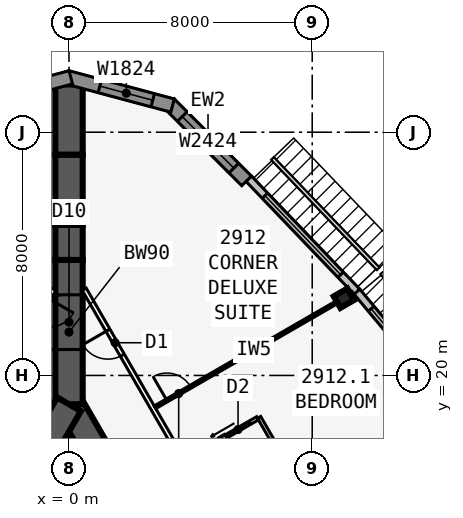
"""IFC4 building model, lengths in metres.
Left out: names, types, materials, properties, quantities, classifications, styles, units other than length and angle.
Written with IfcOpenShell. Run it as: python <this file> out.ifc"""

import sys

from ifc_helpers import new_model, si_unit, direction, frame, frame_2d, origin, origin_2d, place, context, subcontext, project, spatial, polyline, rectangle, i_section, outline, extrude, element, fill, save


model = new_model("IFC4")
c1 = context("Model", 3, precision=1e-05, world=origin(), true_north=direction((0.0, 1.0)))
c2 = subcontext(c1, "Body", "Model", "MODEL_VIEW")
j1 = project(units=[si_unit("LENGTHUNIT", "METRE"), si_unit("PLANEANGLEUNIT", "RADIAN")], contexts=[c1])
p1 = place(None, origin())
s1 = spatial("IfcSite", under=j1, at=p1, CompositionType="ELEMENT")
p2 = place(p1, origin())
s2 = spatial("IfcBuilding", under=s1, at=p2, CompositionType="ELEMENT")
p3 = place(p2, frame((0.0, 0.0, 114.7)))
s3 = spatial("IfcBuildingStorey", under=s2, at=p3, CompositionType="ELEMENT", Elevation=114.7)
p4 = place(p3, frame((16.5, -9.526, 0.0), z_axis=(0.0, 0.0, 1.0), x_axis=(-0.499999749417, 0.866025548458, 0.0)))
e1 = element("IfcWall", 1, at=p4, inside=s3, PredefinedType="SHEAR", context=c2, shape_type="SweptSolid", body=[
    extrude(rectangle(XDim=33.0, YDim=0.9, at=frame_2d((16.5, 0.0))), origin(), (0.0, 0.0, 1.0), 3.4),
])
p5 = place(p4, frame((14.15, 0.0, 0.0)))
e2 = element("IfcOpeningElement", 2, at=p5, cuts=e1, PredefinedType="OPENING", context=c2, shape_type="SweptSolid", body=[
    extrude(rectangle(XDim=1.8, YDim=2.13, at=frame_2d((0.9, 1.065))), frame((0.0, 0.46, 0.0), z_axis=(0.0, -1.0, 0.0), x_axis=(1.0, 0.0, 0.0)), (0.0, 0.0, 1.0), 0.92),
])
p6 = place(p4, frame((12.6, 0.0, 0.0)))
e3 = element("IfcOpeningElement", 3, at=p6, cuts=e1, PredefinedType="OPENING", context=c2, shape_type="SweptSolid", body=[
    extrude(rectangle(XDim=1.0, YDim=2.13, at=frame_2d((0.5, 1.065))), frame((0.0, 0.46, 0.0), z_axis=(0.0, -1.0, 0.0), x_axis=(1.0, 0.0, 0.0)), (0.0, 0.0, 1.0), 0.92),
])
p7 = place(p3, frame((0.0, 19.052, 0.0), z_axis=(0.0, 0.0, 1.0), x_axis=(-0.499999749417, -0.866025548458, 0.0)))
e4 = element("IfcWall", 4, at=p7, inside=s3, PredefinedType="SHEAR", context=c2, shape_type="SweptSolid", body=[
    extrude(rectangle(XDim=33.0, YDim=0.9, at=frame_2d((16.5, 0.0))), origin(), (0.0, 0.0, 1.0), 3.4),
])
p8 = place(p7, frame((14.15, 0.0, 0.0)))
e5 = element("IfcOpeningElement", 5, at=p8, cuts=e4, PredefinedType="OPENING", context=c2, shape_type="SweptSolid", body=[
    extrude(rectangle(XDim=1.8, YDim=2.13, at=frame_2d((0.9, 1.065))), frame((0.0, 0.46, 0.0), z_axis=(0.0, -1.0, 0.0), x_axis=(1.0, 0.0, 0.0)), (0.0, 0.0, 1.0), 0.92),
])
p9 = place(p7, frame((12.6, 0.0, 0.0)))
e6 = element("IfcOpeningElement", 6, at=p9, cuts=e4, PredefinedType="OPENING", context=c2, shape_type="SweptSolid", body=[
    extrude(rectangle(XDim=1.0, YDim=2.13, at=frame_2d((0.5, 1.065))), frame((0.0, 0.46, 0.0), z_axis=(0.0, -1.0, 0.0), x_axis=(1.0, 0.0, 0.0)), (0.0, 0.0, 1.0), 0.92),
])
p10 = place(p3, frame((0.0, 19.052, 0.0), z_axis=(0.0, 0.0, 1.0), x_axis=(0.0, 1.0, 0.0)))
e7 = element("IfcWall", 7, at=p10, inside=s3, PredefinedType="SHEAR", context=c2, shape_type="SweptSolid", body=[
    extrude(rectangle(XDim=4.746, YDim=0.9, at=frame_2d((2.373, 0.0))), origin(), (0.0, 0.0, 1.0), 3.4),
])
p11 = place(p10, frame((1.8, 0.0, 0.0)))
e8 = element("IfcOpeningElement", 8, at=p11, cuts=e7, PredefinedType="OPENING", context=c2, shape_type="SweptSolid", body=[
    extrude(rectangle(XDim=1.8, YDim=2.13, at=frame_2d((0.9, 1.065))), frame((0.0, 0.46, 0.0), z_axis=(0.0, -1.0, 0.0), x_axis=(1.0, 0.0, 0.0)), (0.0, 0.0, 1.0), 0.92),
])
p12 = place(p3, frame((0.0, 23.799, 0.0), z_axis=(0.0, 0.0, 1.0), x_axis=(0.0, 1.0, 0.0)))
e9 = element("IfcWall", 9, at=p12, inside=s3, PredefinedType="SHEAR", context=c2, shape_type="SweptSolid", body=[
    extrude(rectangle(XDim=1.155, YDim=0.9, at=frame_2d((0.577, 0.0))), origin(), (0.0, 0.0, 1.0), 3.4),
])
p13 = place(p3, frame((0.0, 24.953, 0.0), z_axis=(0.0, 0.0, 1.0), x_axis=(0.0, 1.0, 0.0)))
e10 = element("IfcWall", 10, at=p13, inside=s3, PredefinedType="SHEAR", context=c2, shape_type="SweptSolid", body=[
    extrude(rectangle(XDim=2.309, YDim=0.9, at=frame_2d((1.155, 0.0))), origin(), (0.0, 0.0, 1.0), 3.4),
])
p14 = place(p3, frame((0.0, 27.263, 0.0), z_axis=(0.0, 0.0, 1.0), x_axis=(0.0, 1.0, 0.0)))
e11 = element("IfcWall", 11, at=p14, inside=s3, PredefinedType="SHEAR", context=c2, shape_type="SweptSolid", body=[
    extrude(rectangle(XDim=2.31, YDim=0.9, at=frame_2d((1.155, 0.0))), origin(), (0.0, 0.0, 1.0), 3.4),
])
p15 = place(p3, frame((9.041, 22.541, 0.0), z_axis=(0.0, 0.0, 1.0), x_axis=(-0.5, 0.866025403784, 0.0)))
e12 = element("IfcColumn", 12, at=p15, inside=s3, PredefinedType="COLUMN", context=c2, shape_type="SweptSolid", body=[
    extrude(i_section(OverallWidth=0.437, OverallDepth=0.513, WebThickness=0.061, FlangeThickness=0.097, at=origin_2d()), origin(), (0.0, 0.0, 1.0), 3.4),
])
p16 = place(p3, frame((12.723, 18.868, 0.0), z_axis=(0.0, 0.0, 1.0), x_axis=(-0.641810386606, 0.766863369607, 0.0)))
e13 = element("IfcWall", 13, at=p16, inside=s3, PredefinedType="STANDARD", context=c2, shape_type="SweptSolid", body=[
    extrude(rectangle(XDim=5.076, YDim=0.25, at=frame_2d((2.538, 0.0))), origin(), (0.0, 0.0, 1.0), 3.235),
])
p17 = place(p16, frame((0.738, 0.0, 0.45)))
e14 = element("IfcOpeningElement", 14, at=p17, cuts=e13, PredefinedType="OPENING", context=c2, shape_type="SweptSolid", body=[
    extrude(rectangle(XDim=3.6, YDim=2.4, at=frame_2d((1.8, 1.2))), frame((0.0, 0.135, 0.0), z_axis=(0.0, -1.0, 0.0), x_axis=(1.0, 0.0, 0.0)), (0.0, 0.0, 1.0), 0.27),
])
p18 = place(p3, frame((9.471, 22.754, 0.0), z_axis=(0.0, 0.0, 1.0), x_axis=(-0.691719937936, 0.722165858693, 0.0)))
e15 = element("IfcWall", 15, at=p18, inside=s3, PredefinedType="STANDARD", context=c2, shape_type="SweptSolid", body=[
    extrude(rectangle(XDim=5.148, YDim=0.25, at=frame_2d((2.574, 0.0))), origin(), (0.0, 0.0, 1.0), 3.235),
])
p19 = place(p18, frame((0.774, 0.0, 0.45)))
e16 = element("IfcOpeningElement", 16, at=p19, cuts=e15, PredefinedType="OPENING", context=c2, shape_type="SweptSolid", body=[
    extrude(rectangle(XDim=3.6, YDim=2.4, at=frame_2d((1.8, 1.2))), frame((0.0, 0.135, 0.0), z_axis=(0.0, -1.0, 0.0), x_axis=(1.0, 0.0, 0.0)), (0.0, 0.0, 1.0), 0.27),
])
p20 = place(p3, frame((5.841, 26.399, 0.0), z_axis=(0.0, 0.0, 1.0), x_axis=(-0.707106781187, 0.707106781187, 0.0)))
e17 = element("IfcWall", 17, at=p20, inside=s3, PredefinedType="SOLIDWALL", context=c2, shape_type="SweptSolid", body=[
    extrude(rectangle(XDim=3.586, YDim=0.45, at=frame_2d((1.793, 0.0))), origin(), (0.0, 0.0, 1.0), 3.235),
])
p21 = place(p20, frame((0.593, 0.0, 0.45)))
e18 = element("IfcOpeningElement", 18, at=p21, cuts=e17, PredefinedType="OPENING", context=c2, shape_type="SweptSolid", body=[
    extrude(rectangle(XDim=2.4, YDim=2.4, at=frame_2d((1.2, 1.2))), frame((0.0, 0.235, 0.0), z_axis=(0.0, -1.0, 0.0), x_axis=(1.0, 0.0, 0.0)), (0.0, 0.0, 1.0), 0.47),
])
p22 = place(p3, frame((3.406, 28.877, 0.0), z_axis=(0.0, 0.0, 1.0), x_axis=(-0.965924653531, 0.258823421857, 0.0)))
e19 = element("IfcWall", 19, at=p22, inside=s3, PredefinedType="SOLIDWALL", context=c2, shape_type="SweptSolid", body=[
    extrude(outline(polyline([(3.586, 0.225), (3.527, 0.225), (3.035, 0.093), (3.0, 0.225), (0.0, 0.225), (0.0, -0.225), (3.586, -0.225), (3.586, 0.225)])), origin(), (0.0, 0.0, 1.0), 3.235),
])
p23 = place(p22, frame((0.675, 0.0, 0.45)))
e20 = element("IfcOpeningElement", 20, at=p23, cuts=e19, PredefinedType="OPENING", context=c2, shape_type="SweptSolid", body=[
    extrude(rectangle(XDim=1.8, YDim=2.4, at=frame_2d((0.9, 1.2))), frame((0.0, 0.235, 0.0), z_axis=(0.0, -1.0, 0.0), x_axis=(1.0, 0.0, 0.0)), (0.0, 0.0, 1.0), 0.47),
])
p24 = place(p3, frame((0.058, 29.805, 0.0), z_axis=(0.0, 0.0, 1.0), x_axis=(-0.965924653531, -0.258823421857, 0.0)))
e21 = element("IfcWall", 21, at=p24, inside=s3, PredefinedType="SOLIDWALL", context=c2, shape_type="SweptSolid", body=[
    extrude(outline(polyline([(3.586, 0.225), (0.586, 0.225), (0.551, 0.093), (0.06, 0.225), (0.0, 0.225), (0.0, -0.225), (3.586, -0.225), (3.586, 0.225)])), origin(), (0.0, 0.0, 1.0), 3.235),
])
p25 = place(p24, frame((1.111, 0.0, 0.45)))
e22 = element("IfcOpeningElement", 22, at=p25, cuts=e21, PredefinedType="OPENING", context=c2, shape_type="SweptSolid", body=[
    extrude(rectangle(XDim=1.8, YDim=2.4, at=frame_2d((0.9, 1.2))), frame((0.0, 0.235, 0.0), z_axis=(0.0, -1.0, 0.0), x_axis=(1.0, 0.0, 0.0)), (0.0, 0.0, 1.0), 0.47),
])
p26 = place(p3, frame((20.027, -10.985, 0.0), z_axis=(0.0, 0.0, 1.0), x_axis=(-0.500001677587, 0.866024435227, 0.0)))
e23 = element("IfcWall", 23, at=p26, inside=s3, PredefinedType="PARTITIONING", context=c2, shape_type="SweptSolid", body=[
    extrude(rectangle(XDim=39.054, YDim=0.15, at=frame_2d((19.527, 0.0))), origin(), (0.0, 0.0, 1.0), 3.235),
])
p27 = place(p26, frame((0.352, 0.0, 0.0)))
e24 = element("IfcOpeningElement", 24, at=p27, cuts=e23, PredefinedType="OPENING", context=c2, shape_type="SweptSolid", body=[
    extrude(rectangle(XDim=0.95, YDim=2.13, at=frame_2d((0.475, 1.065))), frame((0.0, 0.085, 0.0), z_axis=(0.0, -1.0, 0.0), x_axis=(1.0, 0.0, 0.0)), (0.0, 0.0, 1.0), 0.17),
])
p28 = place(p26, frame((7.752, 0.0, 0.0)))
e25 = element("IfcOpeningElement", 25, at=p28, cuts=e23, PredefinedType="OPENING", context=c2, shape_type="SweptSolid", body=[
    extrude(rectangle(XDim=0.95, YDim=2.13, at=frame_2d((0.475, 1.065))), frame((0.0, 0.085, 0.0), z_axis=(0.0, -1.0, 0.0), x_axis=(1.0, 0.0, 0.0)), (0.0, 0.0, 1.0), 0.17),
])
p29 = place(p26, frame((17.752, 0.0, 0.0)))
e26 = element("IfcOpeningElement", 26, at=p29, cuts=e23, PredefinedType="OPENING", context=c2, shape_type="SweptSolid", body=[
    extrude(rectangle(XDim=0.95, YDim=2.13, at=frame_2d((0.475, 1.065))), frame((0.0, 0.085, 0.0), z_axis=(0.0, -1.0, 0.0), x_axis=(1.0, 0.0, 0.0)), (0.0, 0.0, 1.0), 0.17),
])
p30 = place(p26, frame((22.152, 0.0, 0.0)))
e27 = element("IfcOpeningElement", 27, at=p30, cuts=e23, PredefinedType="OPENING", context=c2, shape_type="SweptSolid", body=[
    extrude(rectangle(XDim=0.95, YDim=2.13, at=frame_2d((0.475, 1.065))), frame((0.0, 0.085, 0.0), z_axis=(0.0, -1.0, 0.0), x_axis=(1.0, 0.0, 0.0)), (0.0, 0.0, 1.0), 0.17),
])
p31 = place(p26, frame((27.152, 0.0, 0.0)))
e28 = element("IfcOpeningElement", 28, at=p31, cuts=e23, PredefinedType="OPENING", context=c2, shape_type="SweptSolid", body=[
    extrude(rectangle(XDim=0.95, YDim=2.13, at=frame_2d((0.475, 1.065))), frame((0.0, 0.085, 0.0), z_axis=(0.0, -1.0, 0.0), x_axis=(1.0, 0.0, 0.0)), (0.0, 0.0, 1.0), 0.17),
])
p32 = place(p26, frame((36.546, 0.0, 0.0)))
e29 = element("IfcOpeningElement", 29, at=p32, cuts=e23, PredefinedType="OPENING", context=c2, shape_type="SweptSolid", body=[
    extrude(rectangle(XDim=0.95, YDim=2.13, at=frame_2d((0.475, 1.065))), frame((0.0, 0.085, 0.0), z_axis=(0.0, -1.0, 0.0), x_axis=(1.0, 0.0, 0.0)), (0.0, 0.0, 1.0), 0.17),
])
p33 = place(p3, frame((5.329, 14.623, 0.0), z_axis=(0.0, 0.0, 1.0), x_axis=(0.866011723728, 0.500023693804, 0.0)))
e30 = element("IfcWall", 30, at=p33, inside=s3, PredefinedType="PARTITIONING", context=c2, shape_type="SweptSolid", body=[
    extrude(rectangle(XDim=8.395, YDim=0.15, at=frame_2d((4.198, 0.0))), origin(), (0.0, 0.0, 1.0), 2.389),
])
p34 = place(p3, frame((2.829, 18.954, 0.0), z_axis=(0.0, 0.0, 1.0), x_axis=(0.866015739374, 0.500016738876, 0.0)))
e31 = element("IfcWall", 31, at=p34, inside=s3, PredefinedType="PARTITIONING", context=c2, shape_type="SweptSolid", body=[
    extrude(rectangle(XDim=7.516, YDim=0.1, at=frame_2d((3.758, 0.0))), origin(), (0.0, 0.0, 1.0), 2.389),
])
p35 = place(p34, frame((0.45, 0.0, 0.0)))
e32 = element("IfcOpeningElement", 32, at=p35, cuts=e31, PredefinedType="OPENING", context=c2, shape_type="SweptSolid", body=[
    extrude(rectangle(XDim=0.9, YDim=2.13, at=frame_2d((0.45, 1.065))), frame((0.0, 0.06, 0.0), z_axis=(0.0, -1.0, 0.0), x_axis=(1.0, 0.0, 0.0)), (0.0, 0.0, 1.0), 0.12),
])
p36 = place(p3, frame((7.753, 16.023, 0.0), z_axis=(0.0, 0.0, 1.0), x_axis=(-0.499990139034, 0.866031096941, 0.0)))
e33 = element("IfcWall", 33, at=p36, inside=s3, PredefinedType="PLUMBINGWALL", context=c2, shape_type="SweptSolid", body=[
    extrude(rectangle(XDim=3.0, YDim=0.12, at=frame_2d((1.5, 0.0))), origin(), (0.0, 0.0, 1.0), 3.235),
])
p37 = place(p3, frame((3.829, 17.221, 0.0), z_axis=(0.0, 0.0, 1.0), x_axis=(0.865997131366, 0.500048966069, 0.0)))
e34 = element("IfcWall", 34, at=p37, inside=s3, PredefinedType="PLUMBINGWALL", context=c2, shape_type="SweptSolid", body=[
    extrude(rectangle(XDim=2.74, YDim=0.12, at=frame_2d((1.37, 0.0))), origin(), (0.0, 0.0, 1.0), 3.235),
])
p38 = place(p37, frame((1.55, 0.0, 0.0)))
e35 = element("IfcOpeningElement", 35, at=p38, cuts=e34, PredefinedType="OPENING", context=c2, shape_type="SweptSolid", body=[
    extrude(rectangle(XDim=0.9, YDim=2.13, at=frame_2d((0.45, 1.065))), frame((0.0, 0.07, 0.0), z_axis=(0.0, -1.0, 0.0), x_axis=(1.0, 0.0, 0.0)), (0.0, 0.0, 1.0), 0.14),
])
p39 = place(p3, frame((-0.5, 22.836, 0.0), z_axis=(0.0, 0.0, 1.0), x_axis=(-0.500001677587, -0.866024435227, 0.0)))
e36 = element("IfcWall", 36, at=p39, inside=s3, PredefinedType="PARTITIONING", context=c2, shape_type="SweptSolid", body=[
    extrude(rectangle(XDim=39.054, YDim=0.15, at=frame_2d((19.527, 0.0))), origin(), (0.0, 0.0, 1.0), 3.235),
])
p40 = place(p39, frame((0.352, 0.0, 0.0)))
e37 = element("IfcOpeningElement", 37, at=p40, cuts=e36, PredefinedType="OPENING", context=c2, shape_type="SweptSolid", body=[
    extrude(rectangle(XDim=0.95, YDim=2.13, at=frame_2d((0.475, 1.065))), frame((0.0, 0.085, 0.0), z_axis=(0.0, -1.0, 0.0), x_axis=(1.0, 0.0, 0.0)), (0.0, 0.0, 1.0), 0.17),
])
p41 = place(p39, frame((7.152, 0.0, 0.0)))
e38 = element("IfcOpeningElement", 38, at=p41, cuts=e36, PredefinedType="OPENING", context=c2, shape_type="SweptSolid", body=[
    extrude(rectangle(XDim=0.95, YDim=2.13, at=frame_2d((0.475, 1.065))), frame((0.0, 0.085, 0.0), z_axis=(0.0, -1.0, 0.0), x_axis=(1.0, 0.0, 0.0)), (0.0, 0.0, 1.0), 0.17),
])
p42 = place(p39, frame((12.152, 0.0, 0.0)))
e39 = element("IfcOpeningElement", 39, at=p42, cuts=e36, PredefinedType="OPENING", context=c2, shape_type="SweptSolid", body=[
    extrude(rectangle(XDim=0.95, YDim=2.13, at=frame_2d((0.475, 1.065))), frame((0.0, 0.085, 0.0), z_axis=(0.0, -1.0, 0.0), x_axis=(1.0, 0.0, 0.0)), (0.0, 0.0, 1.0), 0.17),
])
p43 = place(p39, frame((17.152, 0.0, 0.0)))
e40 = element("IfcOpeningElement", 40, at=p43, cuts=e36, PredefinedType="OPENING", context=c2, shape_type="SweptSolid", body=[
    extrude(rectangle(XDim=0.95, YDim=2.13, at=frame_2d((0.475, 1.065))), frame((0.0, 0.085, 0.0), z_axis=(0.0, -1.0, 0.0), x_axis=(1.0, 0.0, 0.0)), (0.0, 0.0, 1.0), 0.17),
])
p44 = place(p39, frame((22.752, 0.0, 0.0)))
e41 = element("IfcOpeningElement", 41, at=p44, cuts=e36, PredefinedType="OPENING", context=c2, shape_type="SweptSolid", body=[
    extrude(rectangle(XDim=0.95, YDim=2.13, at=frame_2d((0.475, 1.065))), frame((0.0, 0.085, 0.0), z_axis=(0.0, -1.0, 0.0), x_axis=(1.0, 0.0, 0.0)), (0.0, 0.0, 1.0), 0.17),
])
p45 = place(p39, frame((32.152, 0.0, 0.0)))
e42 = element("IfcOpeningElement", 42, at=p45, cuts=e36, PredefinedType="OPENING", context=c2, shape_type="SweptSolid", body=[
    extrude(rectangle(XDim=0.95, YDim=2.13, at=frame_2d((0.475, 1.065))), frame((0.0, 0.085, 0.0), z_axis=(0.0, -1.0, 0.0), x_axis=(1.0, 0.0, 0.0)), (0.0, 0.0, 1.0), 0.17),
])
p46 = place(p39, frame((37.752, 0.0, 0.0)))
e43 = element("IfcOpeningElement", 43, at=p46, cuts=e36, PredefinedType="OPENING", context=c2, shape_type="SweptSolid", body=[
    extrude(rectangle(XDim=0.95, YDim=2.13, at=frame_2d((0.475, 1.065))), frame((0.0, 0.085, 0.0), z_axis=(0.0, -1.0, 0.0), x_axis=(1.0, 0.0, 0.0)), (0.0, 0.0, 1.0), 0.17),
])
p47 = place(p17, origin())
e44 = element("IfcWindow", 44, at=p47, inside=s3, PartitioningType="SINGLE_PANEL", PredefinedType="WINDOW", context=c2, shape_type="SweptSolid", body=[
    extrude(rectangle(XDim=3.6, YDim=2.4, at=frame_2d((1.8, 1.2))), frame((0.0, 0.03, 0.0), z_axis=(0.0, -1.0, 0.0), x_axis=(1.0, 0.0, 0.0)), (0.0, 0.0, 1.0), 0.06),
])
fill(e14, e44)
p48 = place(p19, origin())
e45 = element("IfcWindow", 45, at=p48, inside=s3, PartitioningType="SINGLE_PANEL", PredefinedType="WINDOW", context=c2, shape_type="SweptSolid", body=[
    extrude(rectangle(XDim=3.6, YDim=2.4, at=frame_2d((1.8, 1.2))), frame((0.0, 0.03, 0.0), z_axis=(0.0, -1.0, 0.0), x_axis=(1.0, 0.0, 0.0)), (0.0, 0.0, 1.0), 0.06),
])
fill(e16, e45)
p49 = place(p21, origin())
e46 = element("IfcWindow", 46, at=p49, inside=s3, PartitioningType="SINGLE_PANEL", PredefinedType="WINDOW", context=c2, shape_type="SweptSolid", body=[
    extrude(rectangle(XDim=2.4, YDim=2.4, at=frame_2d((1.2, 1.2))), frame((0.0, 0.03, 0.0), z_axis=(0.0, -1.0, 0.0), x_axis=(1.0, 0.0, 0.0)), (0.0, 0.0, 1.0), 0.06),
])
fill(e18, e46)
p50 = place(p23, origin())
e47 = element("IfcWindow", 47, at=p50, inside=s3, PartitioningType="SINGLE_PANEL", PredefinedType="WINDOW", context=c2, shape_type="SweptSolid", body=[
    extrude(rectangle(XDim=1.8, YDim=2.4, at=frame_2d((0.9, 1.2))), frame((0.0, 0.03, 0.0), z_axis=(0.0, -1.0, 0.0), x_axis=(1.0, 0.0, 0.0)), (0.0, 0.0, 1.0), 0.06),
])
fill(e20, e47)
p51 = place(p35, origin())
e48 = element("IfcDoor", 48, at=p51, inside=s3, OperationType="SINGLE_SWING_LEFT", PredefinedType="DOOR", context=c2, shape_type="SweptSolid", body=[
    extrude(rectangle(XDim=0.9, YDim=2.13, at=frame_2d((0.45, 1.065))), frame((0.0, 0.025, 0.0), z_axis=(0.0, -1.0, 0.0), x_axis=(1.0, 0.0, 0.0)), (0.0, 0.0, 1.0), 0.05),
])
fill(e32, e48)
p52 = place(p38, origin())
e49 = element("IfcDoor", 49, at=p52, inside=s3, OperationType="SLIDING_TO_LEFT", PredefinedType="DOOR", context=c2, shape_type="SweptSolid", body=[
    extrude(rectangle(XDim=0.9, YDim=2.13, at=frame_2d((0.45, 1.065))), frame((0.0, 0.025, 0.0), z_axis=(0.0, -1.0, 0.0), x_axis=(1.0, 0.0, 0.0)), (0.0, 0.0, 1.0), 0.05),
])
fill(e35, e49)
p53 = place(p32, origin())
e50 = element("IfcDoor", 50, at=p53, inside=s3, OperationType="SINGLE_SWING_RIGHT", PredefinedType="DOOR", context=c2, shape_type="SweptSolid", body=[
    extrude(rectangle(XDim=0.95, YDim=2.13, at=frame_2d((0.475, 1.065))), frame((0.0, 0.025, 0.0), z_axis=(0.0, -1.0, 0.0), x_axis=(1.0, 0.0, 0.0)), (0.0, 0.0, 1.0), 0.05),
])
fill(e29, e50)
p54 = place(p11, origin())
e51 = element("IfcDoor", 51, at=p54, inside=s3, OperationType="DOUBLE_DOOR_DOUBLE_SWING", PredefinedType="DOOR", context=c2, shape_type="SweptSolid", body=[
    extrude(rectangle(XDim=1.8, YDim=2.13, at=frame_2d((0.9, 1.065))), frame((0.0, 0.025, 0.0), z_axis=(0.0, -1.0, 0.0), x_axis=(1.0, 0.0, 0.0)), (0.0, 0.0, 1.0), 0.05),
])
fill(e8, e51)
save(model, sys.argv[1])
